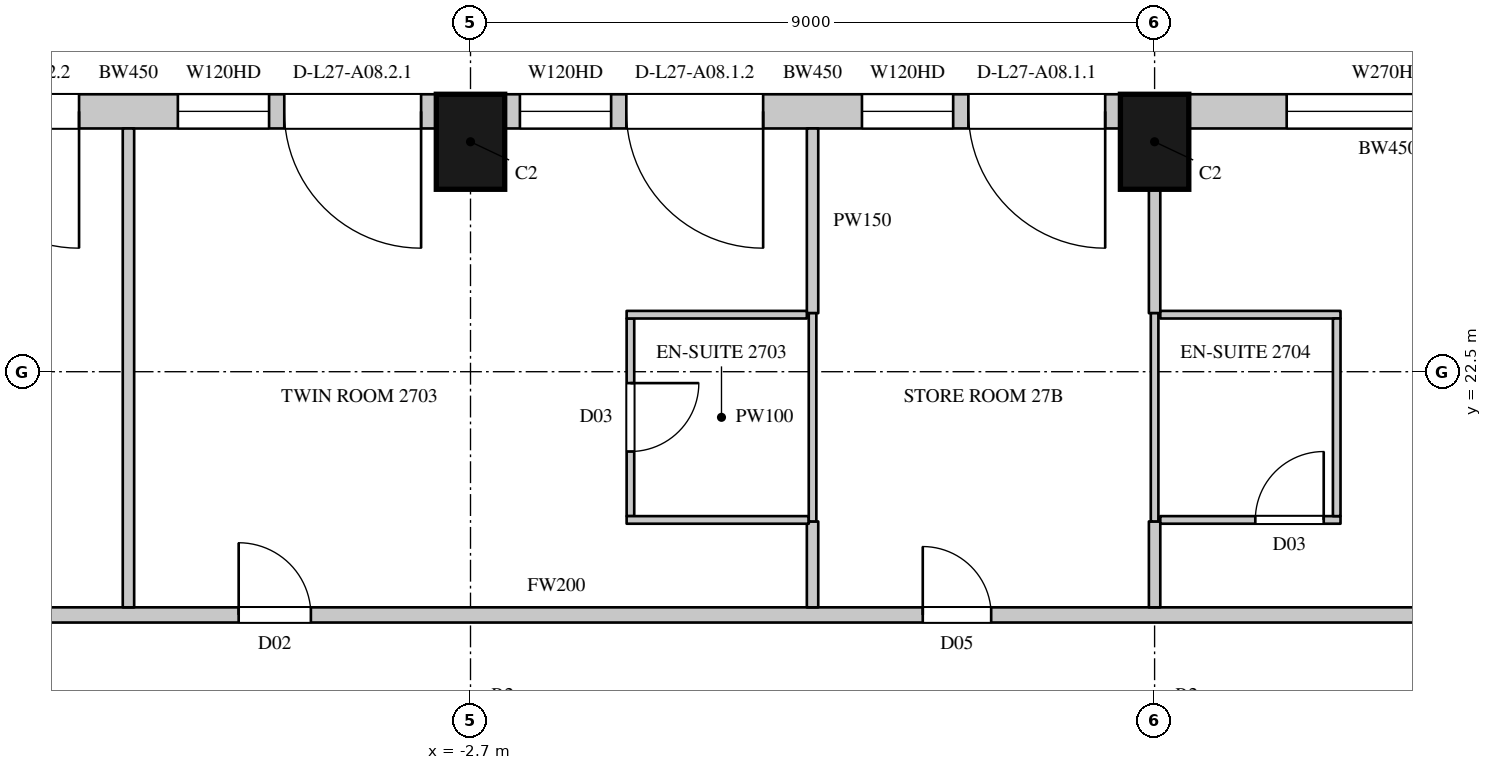
"""IFC4 building model, lengths in metres.
Left out: names, types, materials, properties, quantities, classifications, styles, units other than length and angle.
Written with IfcOpenShell. Run it as: python <this file> out.ifc"""

import sys

from ifc_helpers import new_model, si_unit, direction, frame, frame_2d, origin, origin_2d, place, context, subcontext, project, spatial, rectangle, extrude, element, fill, save


model = new_model("IFC4")
c1 = context("Model", 3, precision=1e-05, world=origin(), true_north=direction((0.0, 1.0)))
c2 = subcontext(c1, "Body", "Model", "MODEL_VIEW")
j1 = project(units=[si_unit("LENGTHUNIT", "METRE"), si_unit("PLANEANGLEUNIT", "RADIAN")], contexts=[c1])
p1 = place(None, origin())
s1 = spatial("IfcSite", under=j1, at=p1, CompositionType="ELEMENT")
p2 = place(p1, origin())
s2 = spatial("IfcBuilding", under=s1, at=p2, CompositionType="ELEMENT")
p3 = place(p2, frame((0.0, 0.0, 127.5)))
s3 = spatial("IfcBuildingStorey", under=s2, at=p3, CompositionType="ELEMENT", Elevation=127.5)
for number, where, z_axis, x_axis in (
    (1, (6.3, 25.525, 0.0), (0.0, 0.0, 1.0), (-1.0, 0.0, 0.0)),
    (2, (-2.7, 25.525, 0.0), (0.0, 0.0, 1.0), (-1.0, 0.0, 0.0)),
):
    element("IfcColumn", number, at=place(p3, frame(where, z_axis=z_axis, x_axis=x_axis)), inside=s3, PredefinedType="COLUMN", context=c2, shape_type="SweptSolid", body=[
        extrude(rectangle(XDim=0.9, YDim=1.25, at=origin_2d()), origin(), (0.0, 0.0, 1.0), 3.6),
    ])
p4 = place(p3, frame((11.989, 25.925, 0.0), z_axis=(0.0, 0.0, 1.0), x_axis=(-1.0, 0.0, 0.0)))
e3 = element("IfcWall", 3, at=p4, inside=s3, PredefinedType="SOLIDWALL", context=c2, shape_type="SweptSolid", body=[
    extrude(rectangle(XDim=5.239, YDim=0.45, at=frame_2d((2.619, 0.0))), origin(), (0.0, 0.0, 1.0), 3.3),
])
p5 = place(p4, frame((1.251, 0.0, 1.05)))
e4 = element("IfcOpeningElement", 4, at=p5, cuts=e3, PredefinedType="OPENING", context=c2, shape_type="SweptSolid", body=[
    extrude(rectangle(XDim=2.7, YDim=2.0, at=frame_2d((1.35, 1.0))), frame((0.0, 0.235, 0.0), z_axis=(0.0, -1.0, 0.0), x_axis=(1.0, 0.0, 0.0)), (0.0, 0.0, 1.0), 0.47),
])
p6 = place(p3, frame((5.85, 25.925, 0.0), z_axis=(0.0, 0.0, 1.0), x_axis=(-1.0, 0.0, 0.0)))
e5 = element("IfcWall", 5, at=p6, inside=s3, PredefinedType="SOLIDWALL", context=c2, shape_type="SweptSolid", body=[
    extrude(rectangle(XDim=8.1, YDim=0.45, at=frame_2d((4.05, 0.0))), origin(), (0.0, 0.0, 1.0), 3.3),
])
p7 = place(p6, frame((0.2, 0.0, 0.0)))
e6 = element("IfcOpeningElement", 6, at=p7, cuts=e5, PredefinedType="OPENING", context=c2, shape_type="SweptSolid", body=[
    extrude(rectangle(XDim=1.8, YDim=2.4, at=frame_2d((0.9, 1.2))), frame((0.0, 0.235, 0.0), z_axis=(0.0, -1.0, 0.0), x_axis=(1.0, 0.0, 0.0)), (0.0, 0.0, 1.0), 0.47),
])
p8 = place(p6, frame((2.2, 0.0, 1.05)))
e7 = element("IfcOpeningElement", 7, at=p8, cuts=e5, PredefinedType="OPENING", context=c2, shape_type="SweptSolid", body=[
    extrude(rectangle(XDim=1.2, YDim=2.0, at=frame_2d((0.6, 1.0))), frame((0.0, 0.235, 0.0), z_axis=(0.0, -1.0, 0.0), x_axis=(1.0, 0.0, 0.0)), (0.0, 0.0, 1.0), 0.47),
])
p9 = place(p6, frame((4.7, 0.0, 0.0)))
e8 = element("IfcOpeningElement", 8, at=p9, cuts=e5, PredefinedType="OPENING", context=c2, shape_type="SweptSolid", body=[
    extrude(rectangle(XDim=1.8, YDim=2.4, at=frame_2d((0.9, 1.2))), frame((0.0, 0.235, 0.0), z_axis=(0.0, -1.0, 0.0), x_axis=(1.0, 0.0, 0.0)), (0.0, 0.0, 1.0), 0.47),
])
p10 = place(p6, frame((6.7, 0.0, 1.05)))
e9 = element("IfcOpeningElement", 9, at=p10, cuts=e5, PredefinedType="OPENING", context=c2, shape_type="SweptSolid", body=[
    extrude(rectangle(XDim=1.2, YDim=2.0, at=frame_2d((0.6, 1.0))), frame((0.0, 0.235, 0.0), z_axis=(0.0, -1.0, 0.0), x_axis=(1.0, 0.0, 0.0)), (0.0, 0.0, 1.0), 0.47),
])
p11 = place(p3, frame((-3.15, 25.925, 0.0), z_axis=(0.0, 0.0, 1.0), x_axis=(-1.0, 0.0, 0.0)))
e10 = element("IfcWall", 10, at=p11, inside=s3, PredefinedType="SOLIDWALL", context=c2, shape_type="SweptSolid", body=[
    extrude(rectangle(XDim=8.1, YDim=0.45, at=frame_2d((4.05, 0.0))), origin(), (0.0, 0.0, 1.0), 3.3),
])
p12 = place(p11, frame((0.2, 0.0, 0.0)))
e11 = element("IfcOpeningElement", 11, at=p12, cuts=e10, PredefinedType="OPENING", context=c2, shape_type="SweptSolid", body=[
    extrude(rectangle(XDim=1.8, YDim=2.4, at=frame_2d((0.9, 1.2))), frame((0.0, 0.235, 0.0), z_axis=(0.0, -1.0, 0.0), x_axis=(1.0, 0.0, 0.0)), (0.0, 0.0, 1.0), 0.47),
])
p13 = place(p11, frame((2.2, 0.0, 1.05)))
e12 = element("IfcOpeningElement", 12, at=p13, cuts=e10, PredefinedType="OPENING", context=c2, shape_type="SweptSolid", body=[
    extrude(rectangle(XDim=1.2, YDim=2.0, at=frame_2d((0.6, 1.0))), frame((0.0, 0.235, 0.0), z_axis=(0.0, -1.0, 0.0), x_axis=(1.0, 0.0, 0.0)), (0.0, 0.0, 1.0), 0.47),
])
p14 = place(p11, frame((4.7, 0.0, 0.0)))
e13 = element("IfcOpeningElement", 13, at=p14, cuts=e10, PredefinedType="OPENING", context=c2, shape_type="SweptSolid", body=[
    extrude(rectangle(XDim=1.8, YDim=2.4, at=frame_2d((0.9, 1.2))), frame((0.0, 0.235, 0.0), z_axis=(0.0, -1.0, 0.0), x_axis=(1.0, 0.0, 0.0)), (0.0, 0.0, 1.0), 0.47),
])
p15 = place(p11, frame((6.7, 0.0, 1.05)))
e14 = element("IfcOpeningElement", 14, at=p15, cuts=e10, PredefinedType="OPENING", context=c2, shape_type="SweptSolid", body=[
    extrude(rectangle(XDim=1.2, YDim=2.0, at=frame_2d((0.6, 1.0))), frame((0.0, 0.235, 0.0), z_axis=(0.0, -1.0, 0.0), x_axis=(1.0, 0.0, 0.0)), (0.0, 0.0, 1.0), 0.47),
])
p16 = place(p3, frame((-20.8, 19.3, 0.0), z_axis=(0.0, 0.0, 1.0), x_axis=(1.0, 0.0, 0.0)))
e15 = element("IfcWall", 15, at=p16, inside=s3, PredefinedType="PARTITIONING", context=c2, shape_type="SweptSolid", body=[
    extrude(rectangle(XDim=38.464, YDim=0.2, at=frame_2d((19.232, 0.0))), origin(), (0.0, 0.0, 1.0), 3.3),
])
p17 = place(p16, frame((24.05, 0.0, 0.0)))
e16 = element("IfcOpeningElement", 16, at=p17, cuts=e15, PredefinedType="OPENING", context=c2, shape_type="SweptSolid", body=[
    extrude(rectangle(XDim=0.9, YDim=2.2, at=frame_2d((0.45, 1.1))), frame((0.0, 0.11, 0.0), z_axis=(0.0, -1.0, 0.0), x_axis=(1.0, 0.0, 0.0)), (0.0, 0.0, 1.0), 0.22),
])
p18 = place(p16, frame((11.2, 0.0, 0.0)))
e17 = element("IfcOpeningElement", 17, at=p18, cuts=e15, PredefinedType="OPENING", context=c2, shape_type="SweptSolid", body=[
    extrude(rectangle(XDim=0.95, YDim=2.2, at=frame_2d((0.475, 1.1))), frame((0.0, 0.11, 0.0), z_axis=(0.0, -1.0, 0.0), x_axis=(1.0, 0.0, 0.0)), (0.0, 0.0, 1.0), 0.22),
])
p19 = place(p16, frame((15.05, 0.0, 0.0)))
e18 = element("IfcOpeningElement", 18, at=p19, cuts=e15, PredefinedType="OPENING", context=c2, shape_type="SweptSolid", body=[
    extrude(rectangle(XDim=0.95, YDim=2.2, at=frame_2d((0.475, 1.1))), frame((0.0, 0.11, 0.0), z_axis=(0.0, -1.0, 0.0), x_axis=(1.0, 0.0, 0.0)), (0.0, 0.0, 1.0), 0.22),
])
p20 = place(p16, frame((32.0, 0.0, 0.0)))
e19 = element("IfcOpeningElement", 19, at=p20, cuts=e15, PredefinedType="OPENING", context=c2, shape_type="SweptSolid", body=[
    extrude(rectangle(XDim=0.95, YDim=2.2, at=frame_2d((0.475, 1.1))), frame((0.0, 0.11, 0.0), z_axis=(0.0, -1.0, 0.0), x_axis=(1.0, 0.0, 0.0)), (0.0, 0.0, 1.0), 0.22),
])
p21 = place(p3, frame((-7.2, 19.4, 0.0), z_axis=(0.0, 0.0, 1.0), x_axis=(0.0, 1.0, 0.0)))
e20 = element("IfcWall", 20, at=p21, inside=s3, PredefinedType="PARTITIONING", context=c2, shape_type="SweptSolid", body=[
    extrude(rectangle(XDim=6.3, YDim=0.15, at=frame_2d((3.15, 0.0))), origin(), (0.0, 0.0, 1.0), 2.65),
])
p22 = place(p3, frame((1.8, 19.4, 0.0), z_axis=(0.0, 0.0, 1.0), x_axis=(0.0, 1.0, 0.0)))
e21 = element("IfcWall", 21, at=p22, inside=s3, PredefinedType="PARTITIONING", context=c2, shape_type="SweptSolid", body=[
    extrude(rectangle(XDim=1.13, YDim=0.15, at=frame_2d((0.565, 0.0))), origin(), (0.0, 0.0, 1.0), 2.65),
])
p23 = place(p3, frame((1.8, 23.27, 0.0), z_axis=(0.0, 0.0, 1.0), x_axis=(0.0, 1.0, 0.0)))
e22 = element("IfcWall", 22, at=p23, inside=s3, PredefinedType="PARTITIONING", context=c2, shape_type="SweptSolid", body=[
    extrude(rectangle(XDim=2.43, YDim=0.15, at=frame_2d((1.215, 0.0))), origin(), (0.0, 0.0, 1.0), 2.65),
])
p24 = place(p3, frame((6.3, 19.4, 0.0), z_axis=(0.0, 0.0, 1.0), x_axis=(0.0, 1.0, 0.0)))
e23 = element("IfcWall", 23, at=p24, inside=s3, PredefinedType="PARTITIONING", context=c2, shape_type="SweptSolid", body=[
    extrude(rectangle(XDim=1.13, YDim=0.15, at=frame_2d((0.565, 0.0))), origin(), (0.0, 0.0, 1.0), 2.75),
])
p25 = place(p3, frame((6.3, 23.27, 0.0), z_axis=(0.0, 0.0, 1.0), x_axis=(0.0, 1.0, 0.0)))
e24 = element("IfcWall", 24, at=p25, inside=s3, PredefinedType="PARTITIONING", context=c2, shape_type="SweptSolid", body=[
    extrude(rectangle(XDim=1.63, YDim=0.15, at=frame_2d((0.815, 0.0))), origin(), (0.0, 0.0, 1.0), 2.75),
])
p26 = place(p3, frame((-0.596, 20.6, 0.0), z_axis=(0.0, 0.0, 1.0), x_axis=(0.0, 1.0, 0.0)))
e25 = element("IfcWall", 25, at=p26, inside=s3, PredefinedType="PARTITIONING", context=c2, shape_type="SweptSolid", body=[
    extrude(rectangle(XDim=2.6, YDim=0.1, at=frame_2d((1.3, 0.0))), origin(), (0.0, 0.0, 1.0), 3.3),
])
p27 = place(p26, frame((0.85, 0.0, 0.0)))
e26 = element("IfcOpeningElement", 26, at=p27, cuts=e25, PredefinedType="OPENING", context=c2, shape_type="SweptSolid", body=[
    extrude(rectangle(XDim=0.9, YDim=2.2, at=frame_2d((0.45, 1.1))), frame((0.0, 0.06, 0.0), z_axis=(0.0, -1.0, 0.0), x_axis=(1.0, 0.0, 0.0)), (0.0, 0.0, 1.0), 0.12),
])
p28 = place(p3, frame((-0.646, 20.55, 0.0), z_axis=(0.0, 0.0, 1.0), x_axis=(1.0, 0.0, 0.0)))
e27 = element("IfcWall", 27, at=p28, inside=s3, PredefinedType="PARTITIONING", context=c2, shape_type="SweptSolid", body=[
    extrude(rectangle(XDim=2.396, YDim=0.1, at=frame_2d((1.198, 0.0))), origin(), (0.0, 0.0, 1.0), 3.3),
])
p29 = place(p3, frame((-0.646, 23.25, 0.0), z_axis=(0.0, 0.0, 1.0), x_axis=(1.0, 0.0, 0.0)))
e28 = element("IfcWall", 28, at=p29, inside=s3, PredefinedType="PARTITIONING", context=c2, shape_type="SweptSolid", body=[
    extrude(rectangle(XDim=2.371, YDim=0.1, at=frame_2d((1.186, 0.0))), origin(), (0.0, 0.0, 1.0), 3.3),
])
p30 = place(p3, frame((1.8, 20.53, 0.0), z_axis=(0.0, 0.0, 1.0), x_axis=(0.0, 1.0, 0.0)))
e29 = element("IfcWall", 29, at=p30, inside=s3, PredefinedType="PARTITIONING", context=c2, shape_type="SweptSolid", body=[
    extrude(rectangle(XDim=2.74, YDim=0.1, at=frame_2d((1.37, 0.0))), origin(), (0.0, 0.0, 1.0), 2.65),
])
p31 = place(p3, frame((6.3, 20.53, 0.0), z_axis=(0.0, 0.0, 1.0), x_axis=(0.0, 1.0, 0.0)))
e30 = element("IfcWall", 30, at=p31, inside=s3, PredefinedType="PARTITIONING", context=c2, shape_type="SweptSolid", body=[
    extrude(rectangle(XDim=2.74, YDim=0.1, at=frame_2d((1.37, 0.0))), origin(), (0.0, 0.0, 1.0), 2.75),
])
p32 = place(p3, frame((6.375, 20.55, 0.0), z_axis=(0.0, 0.0, 1.0), x_axis=(1.0, 0.0, 0.0)))
e31 = element("IfcWall", 31, at=p32, inside=s3, PredefinedType="PARTITIONING", context=c2, shape_type="SweptSolid", body=[
    extrude(rectangle(XDim=2.371, YDim=0.1, at=frame_2d((1.186, 0.0))), origin(), (0.0, 0.0, 1.0), 3.3),
])
p33 = place(p32, frame((1.25, 0.0, 0.0)))
e32 = element("IfcOpeningElement", 32, at=p33, cuts=e31, PredefinedType="OPENING", context=c2, shape_type="SweptSolid", body=[
    extrude(rectangle(XDim=0.9, YDim=2.2, at=frame_2d((0.45, 1.1))), frame((0.0, 0.06, 0.0), z_axis=(0.0, -1.0, 0.0), x_axis=(1.0, 0.0, 0.0)), (0.0, 0.0, 1.0), 0.12),
])
p34 = place(p3, frame((6.375, 23.25, 0.0), z_axis=(0.0, 0.0, 1.0), x_axis=(1.0, 0.0, 0.0)))
e33 = element("IfcWall", 33, at=p34, inside=s3, PredefinedType="PARTITIONING", context=c2, shape_type="SweptSolid", body=[
    extrude(rectangle(XDim=2.371, YDim=0.1, at=frame_2d((1.186, 0.0))), origin(), (0.0, 0.0, 1.0), 3.3),
])
p35 = place(p3, frame((8.696, 20.6, 0.0), z_axis=(0.0, 0.0, 1.0), x_axis=(0.0, 1.0, 0.0)))
e34 = element("IfcWall", 34, at=p35, inside=s3, PredefinedType="PARTITIONING", context=c2, shape_type="SweptSolid", body=[
    extrude(rectangle(XDim=2.6, YDim=0.1, at=frame_2d((1.3, 0.0))), origin(), (0.0, 0.0, 1.0), 3.3),
])
p36 = place(p5, origin())
e35 = element("IfcWindow", 35, at=p36, inside=s3, PartitioningType="SINGLE_PANEL", PredefinedType="WINDOW", context=c2, shape_type="SweptSolid", body=[
    extrude(rectangle(XDim=2.7, YDim=2.0, at=frame_2d((1.35, 1.0))), frame((0.0, 0.135, 0.0), z_axis=(0.0, -1.0, 0.0), x_axis=(1.0, 0.0, 0.0)), (0.0, 0.0, 1.0), 0.06),
])
fill(e4, e35)
p37 = place(p7, origin())
e36 = element("IfcDoor", 36, at=p37, inside=s3, OperationType="SLIDING_TO_LEFT", PredefinedType="DOOR", context=c2, shape_type="SweptSolid", body=[
    extrude(rectangle(XDim=1.8, YDim=2.4, at=frame_2d((0.9, 1.2))), frame((0.0, 0.13, 0.0), z_axis=(0.0, -1.0, 0.0), x_axis=(1.0, 0.0, 0.0)), (0.0, 0.0, 1.0), 0.05),
])
fill(e6, e36)
p38 = place(p8, origin())
e37 = element("IfcWindow", 37, at=p38, inside=s3, PartitioningType="SINGLE_PANEL", PredefinedType="WINDOW", context=c2, shape_type="SweptSolid", body=[
    extrude(rectangle(XDim=1.2, YDim=2.0, at=frame_2d((0.6, 1.0))), frame((0.0, 0.135, 0.0), z_axis=(0.0, -1.0, 0.0), x_axis=(1.0, 0.0, 0.0)), (0.0, 0.0, 1.0), 0.06),
])
fill(e7, e37)
p39 = place(p9, origin())
e38 = element("IfcDoor", 38, at=p39, inside=s3, OperationType="SLIDING_TO_LEFT", PredefinedType="DOOR", context=c2, shape_type="SweptSolid", body=[
    extrude(rectangle(XDim=1.8, YDim=2.4, at=frame_2d((0.9, 1.2))), frame((0.0, 0.13, 0.0), z_axis=(0.0, -1.0, 0.0), x_axis=(1.0, 0.0, 0.0)), (0.0, 0.0, 1.0), 0.05),
])
fill(e8, e38)
p40 = place(p10, origin())
e39 = element("IfcWindow", 39, at=p40, inside=s3, PartitioningType="SINGLE_PANEL", PredefinedType="WINDOW", context=c2, shape_type="SweptSolid", body=[
    extrude(rectangle(XDim=1.2, YDim=2.0, at=frame_2d((0.6, 1.0))), frame((0.0, 0.135, 0.0), z_axis=(0.0, -1.0, 0.0), x_axis=(1.0, 0.0, 0.0)), (0.0, 0.0, 1.0), 0.06),
])
fill(e9, e39)
p41 = place(p12, origin())
e40 = element("IfcDoor", 40, at=p41, inside=s3, OperationType="SLIDING_TO_LEFT", PredefinedType="DOOR", context=c2, shape_type="SweptSolid", body=[
    extrude(rectangle(XDim=1.8, YDim=2.4, at=frame_2d((0.9, 1.2))), frame((0.0, 0.13, 0.0), z_axis=(0.0, -1.0, 0.0), x_axis=(1.0, 0.0, 0.0)), (0.0, 0.0, 1.0), 0.05),
])
fill(e11, e40)
p42 = place(p13, origin())
e41 = element("IfcWindow", 41, at=p42, inside=s3, PartitioningType="SINGLE_PANEL", PredefinedType="WINDOW", context=c2, shape_type="SweptSolid", body=[
    extrude(rectangle(XDim=1.2, YDim=2.0, at=frame_2d((0.6, 1.0))), frame((0.0, 0.135, 0.0), z_axis=(0.0, -1.0, 0.0), x_axis=(1.0, 0.0, 0.0)), (0.0, 0.0, 1.0), 0.06),
])
fill(e12, e41)
p43 = place(p14, origin())
e42 = element("IfcDoor", 42, at=p43, inside=s3, OperationType="SLIDING_TO_LEFT", PredefinedType="DOOR", context=c2, shape_type="SweptSolid", body=[
    extrude(rectangle(XDim=1.8, YDim=2.4, at=frame_2d((0.9, 1.2))), frame((0.0, 0.13, 0.0), z_axis=(0.0, -1.0, 0.0), x_axis=(1.0, 0.0, 0.0)), (0.0, 0.0, 1.0), 0.05),
])
fill(e13, e42)
p44 = place(p17, origin())
e43 = element("IfcDoor", 43, at=p44, inside=s3, OperationType="SINGLE_SWING_LEFT", PredefinedType="DOOR", context=c2, shape_type="SweptSolid", body=[
    extrude(rectangle(XDim=0.9, YDim=2.2, at=frame_2d((0.45, 1.1))), frame((0.0, 0.025, 0.0), z_axis=(0.0, -1.0, 0.0), x_axis=(1.0, 0.0, 0.0)), (0.0, 0.0, 1.0), 0.05),
])
fill(e16, e43)
p45 = place(p19, origin())
e44 = element("IfcDoor", 44, at=p45, inside=s3, OperationType="SINGLE_SWING_LEFT", PredefinedType="DOOR", context=c2, shape_type="SweptSolid", body=[
    extrude(rectangle(XDim=0.95, YDim=2.2, at=frame_2d((0.475, 1.1))), frame((0.0, 0.025, 0.0), z_axis=(0.0, -1.0, 0.0), x_axis=(1.0, 0.0, 0.0)), (0.0, 0.0, 1.0), 0.05),
])
fill(e18, e44)
p46 = place(p27, origin())
e45 = element("IfcDoor", 45, at=p46, inside=s3, OperationType="SINGLE_SWING_LEFT", PredefinedType="DOOR", context=c2, shape_type="SweptSolid", body=[
    extrude(rectangle(XDim=0.9, YDim=2.2, at=frame_2d((0.45, 1.1))), frame((0.0, 0.025, 0.0), z_axis=(0.0, -1.0, 0.0), x_axis=(1.0, 0.0, 0.0)), (0.0, 0.0, 1.0), 0.05),
])
fill(e26, e45)
p47 = place(p33, origin())
e46 = element("IfcDoor", 46, at=p47, inside=s3, OperationType="SINGLE_SWING_RIGHT", PredefinedType="DOOR", context=c2, shape_type="SweptSolid", body=[
    extrude(rectangle(XDim=0.9, YDim=2.2, at=frame_2d((0.45, 1.1))), frame((0.0, 0.025, 0.0), z_axis=(0.0, -1.0, 0.0), x_axis=(1.0, 0.0, 0.0)), (0.0, 0.0, 1.0), 0.05),
])
fill(e32, e46)
save(model, sys.argv[1])
